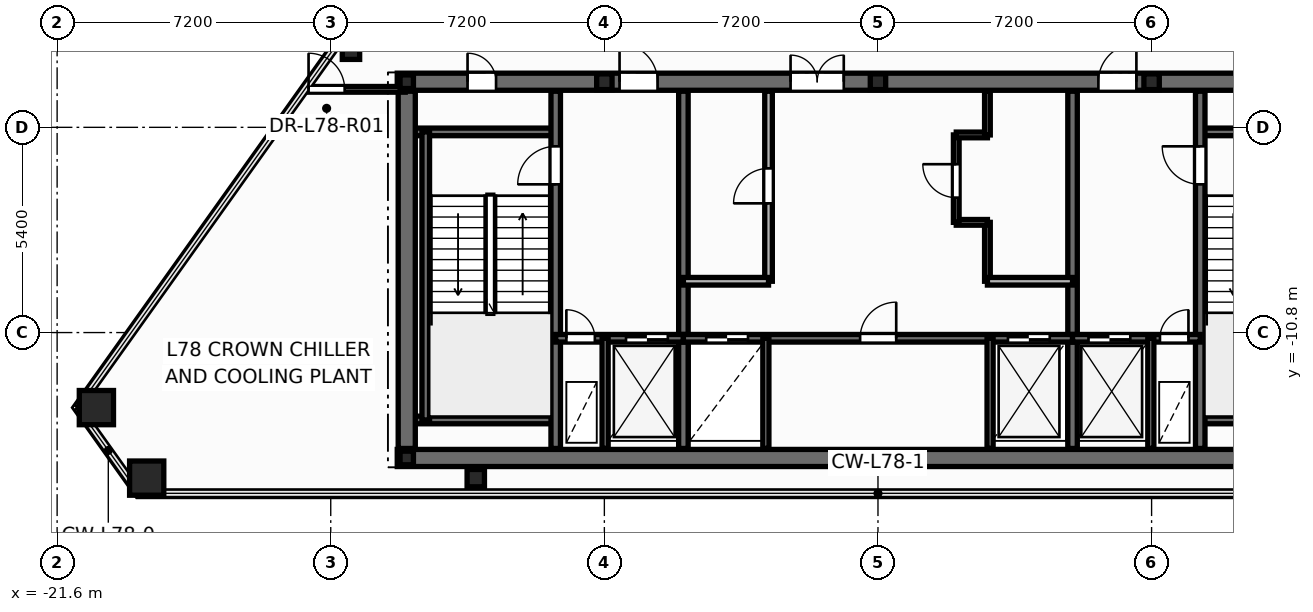
"""IFC4 building model, lengths in metres.
Left out: names, types, materials, properties, quantities, classifications, styles, units other than length and angle.
Written with IfcOpenShell. Run it as: python <this file> out.ifc"""

import sys

from ifc_helpers import new_model, si_unit, direction, frame, frame_2d, origin, origin_2d, place, context, subcontext, project, spatial, rectangle, hollow_rectangle, hollow_circle, i_section, extrude, element, fill, save


model = new_model("IFC4")
c1 = context("Model", 3, precision=1e-05, world=origin(), true_north=direction((0.0, 1.0)))
c2 = subcontext(c1, "Body", "Model", "MODEL_VIEW")
j1 = project(units=[si_unit("LENGTHUNIT", "METRE"), si_unit("PLANEANGLEUNIT", "RADIAN")], contexts=[c1])
p1 = place(None, origin())
s1 = spatial("IfcSite", under=j1, at=p1, CompositionType="ELEMENT")
p2 = place(p1, origin())
s2 = spatial("IfcBuilding", under=s1, at=p2, CompositionType="ELEMENT")
p3 = place(p2, frame((0.0, 0.0, 297.6)))
s3 = spatial("IfcBuildingStorey", under=s2, at=p3, CompositionType="ELEMENT", Elevation=297.6)
for number, where, z_axis, x_axis in (
    (1, (-20.567, -12.775, 0.0), (0.0, 0.0, 1.0), (1.0, 0.0, 0.0)),
    (2, (-19.243, -14.63, 0.0), (0.0, 0.0, 1.0), (1.0, 0.0, 0.0)),
):
    element("IfcColumn", number, at=place(p3, frame(where, z_axis=z_axis, x_axis=x_axis)), inside=s3, PredefinedType="COLUMN", context=c2, shape_type="SweptSolid", body=[
        extrude(hollow_rectangle(XDim=0.9, YDim=0.9, WallThickness=0.04, at=origin_2d()), origin(), (0.0, 0.0, 1.0), 4.2),
    ])
for number, where, z_axis, x_axis in (
    (3, (-10.583, -14.63, 0.0), (0.0, 0.0, 1.0), (1.0, 0.0, 0.0)),
    (4, (-13.868, -3.385, 0.0), (0.0, 0.0, 1.0), (1.0, 0.0, 0.0)),
):
    element("IfcColumn", number, at=place(p3, frame(where, z_axis=z_axis, x_axis=x_axis)), inside=s3, PredefinedType="COLUMN", context=c2, shape_type="SweptSolid", body=[
        extrude(hollow_circle(Radius=0.229, WallThickness=0.016, at=origin_2d()), origin(), (0.0, 0.0, 1.0), 4.2),
    ])
for number, where, z_axis, x_axis in (
    (5, (-12.4, -14.1, 0.0), (0.0, 0.0, 1.0), (1.0, 0.0, 0.0)),
    (6, (-12.4, -4.2, 0.0), (0.0, 0.0, 1.0), (1.0, 0.0, 0.0)),
):
    element("IfcColumn", number, at=place(p3, frame(where, z_axis=z_axis, x_axis=x_axis)), inside=s3, PredefinedType="COLUMN", context=c2, shape_type="SweptSolid", body=[
        extrude(i_section(OverallWidth=0.352, OverallDepth=0.359, WebThickness=0.018, FlangeThickness=0.026, at=origin_2d()), origin(), (0.0, 0.0, 1.0), 4.2),
    ])
for number, where, z_axis, x_axis in (
    (7, (-7.2, -4.2, 0.0), (0.0, 0.0, 1.0), (1.0, 0.0, 0.0)),
    (8, (0.0, -4.2, 0.0), (0.0, 0.0, 1.0), (1.0, 0.0, 0.0)),
    (9, (7.2, -4.2, 0.0), (0.0, 0.0, 1.0), (1.0, 0.0, 0.0)),
):
    element("IfcColumn", number, at=place(p3, frame(where, z_axis=z_axis, x_axis=x_axis)), inside=s3, PredefinedType="PILASTER", context=c2, shape_type="SweptSolid", body=[
        extrude(i_section(OverallWidth=0.405, OverallDepth=0.414, WebThickness=0.022, FlangeThickness=0.032, at=origin_2d()), origin(), (0.0, 0.0, 1.0), 4.2),
    ])
p4 = place(p3, frame((2.88, -9.45, 0.0), z_axis=(0.0, 0.0, 1.0), x_axis=(0.0, 1.0, 0.0)))
e10 = element("IfcWall", 10, at=p4, inside=s3, PredefinedType="PARTITIONING", context=c2, shape_type="SweptSolid", body=[
    extrude(rectangle(XDim=1.55, YDim=0.15, at=frame_2d((0.775, 0.0))), origin(), (0.0, 0.0, 1.0), 3.88),
])
p5 = place(p3, frame((2.06, -7.9, 0.0), z_axis=(0.0, 0.0, 1.0), x_axis=(1.0, 0.0, 0.0)))
e11 = element("IfcWall", 11, at=p5, inside=s3, PredefinedType="PARTITIONING", context=c2, shape_type="SweptSolid", body=[
    extrude(rectangle(XDim=0.82, YDim=0.15, at=frame_2d((0.41, 0.0))), origin(), (0.0, 0.0, 1.0), 3.88),
])
p6 = place(p3, frame((2.06, -7.9, 0.0), z_axis=(0.0, 0.0, 1.0), x_axis=(0.0, 1.0, 0.0)))
e12 = element("IfcWall", 12, at=p6, inside=s3, PredefinedType="PARTITIONING", context=c2, shape_type="SweptSolid", body=[
    extrude(rectangle(XDim=2.3, YDim=0.15, at=frame_2d((1.15, 0.0))), origin(), (0.0, 0.0, 1.0), 3.88),
])
p7 = place(p6, frame((0.65, 0.0, 0.0)))
e13 = element("IfcOpeningElement", 13, at=p7, cuts=e12, PredefinedType="OPENING", context=c2, shape_type="SweptSolid", body=[
    extrude(rectangle(XDim=0.886, YDim=2.104, at=frame_2d((0.44, 1.052))), frame((0.0, 0.085, 0.0), z_axis=(0.0, -1.0, 0.0), x_axis=(1.0, 0.0, 0.0)), (0.0, 0.0, 1.0), 0.17),
])
p8 = place(p3, frame((2.06, -5.6, 0.0), z_axis=(0.0, 0.0, 1.0), x_axis=(1.0, 0.0, 0.0)))
e14 = element("IfcWall", 14, at=p8, inside=s3, PredefinedType="PARTITIONING", context=c2, shape_type="SweptSolid", body=[
    extrude(rectangle(XDim=0.82, YDim=0.15, at=frame_2d((0.41, 0.0))), origin(), (0.0, 0.0, 1.0), 3.88),
])
p9 = place(p3, frame((2.88, -5.6, 0.0), z_axis=(0.0, 0.0, 1.0), x_axis=(0.0, 1.0, 0.0)))
e15 = element("IfcWall", 15, at=p9, inside=s3, PredefinedType="PARTITIONING", context=c2, shape_type="SweptSolid", body=[
    extrude(rectangle(XDim=1.15, YDim=0.15, at=frame_2d((0.575, 0.0))), origin(), (0.0, 0.0, 1.0), 3.88),
])
p10 = place(p3, frame((-12.65, -14.1, 0.0), z_axis=(0.0, 0.0, 1.0), x_axis=(1.0, 0.0, 0.0)))
e16 = element("IfcWall", 16, at=p10, inside=s3, PredefinedType="SHEAR", context=c2, shape_type="SweptSolid", body=[
    extrude(rectangle(XDim=25.3, YDim=0.45, at=frame_2d((12.65, 0.0))), origin(), (0.0, 0.0, 1.0), 4.2),
])
p11 = place(p3, frame((-12.65, -4.2, 0.0), z_axis=(0.0, 0.0, 1.0), x_axis=(1.0, 0.0, 0.0)))
e17 = element("IfcWall", 17, at=p11, inside=s3, PredefinedType="SHEAR", context=c2, shape_type="SweptSolid", body=[
    extrude(rectangle(XDim=25.3, YDim=0.45, at=frame_2d((12.65, 0.0))), origin(), (0.0, 0.0, 1.0), 4.2),
])
p12 = place(p11, frame((1.85, 0.0, 0.0)))
e18 = element("IfcOpeningElement", 18, at=p12, cuts=e17, PredefinedType="OPENING", context=c2, shape_type="SweptSolid", body=[
    extrude(rectangle(XDim=0.756, YDim=2.054, at=frame_2d((0.375, 1.027))), frame((0.0, 0.235, 0.0), z_axis=(0.0, -1.0, 0.0), x_axis=(1.0, 0.0, 0.0)), (0.0, 0.0, 1.0), 0.47),
])
p13 = place(p11, frame((22.65, 0.0, 0.0)))
e19 = element("IfcOpeningElement", 19, at=p13, cuts=e17, PredefinedType="OPENING", context=c2, shape_type="SweptSolid", body=[
    extrude(rectangle(XDim=0.756, YDim=2.054, at=frame_2d((0.375, 1.027))), frame((0.0, 0.235, 0.0), z_axis=(0.0, -1.0, 0.0), x_axis=(1.0, 0.0, 0.0)), (0.0, 0.0, 1.0), 0.47),
])
p14 = place(p11, frame((5.85, 0.0, 0.0)))
e20 = element("IfcOpeningElement", 20, at=p14, cuts=e17, PredefinedType="OPENING", context=c2, shape_type="SweptSolid", body=[
    extrude(rectangle(XDim=1.006, YDim=2.104, at=frame_2d((0.5, 1.052))), frame((0.0, 0.235, 0.0), z_axis=(0.0, -1.0, 0.0), x_axis=(1.0, 0.0, 0.0)), (0.0, 0.0, 1.0), 0.47),
])
p15 = place(p11, frame((10.35, 0.0, 0.0)))
e21 = element("IfcOpeningElement", 21, at=p15, cuts=e17, PredefinedType="OPENING", context=c2, shape_type="SweptSolid", body=[
    extrude(rectangle(XDim=1.406, YDim=2.154, at=frame_2d((0.7, 1.077))), frame((0.0, 0.235, 0.0), z_axis=(0.0, -1.0, 0.0), x_axis=(1.0, 0.0, 0.0)), (0.0, 0.0, 1.0), 0.47),
])
p16 = place(p11, frame((18.45, 0.0, 0.0)))
e22 = element("IfcOpeningElement", 22, at=p16, cuts=e17, PredefinedType="OPENING", context=c2, shape_type="SweptSolid", body=[
    extrude(rectangle(XDim=1.006, YDim=2.104, at=frame_2d((0.5, 1.052))), frame((0.0, 0.235, 0.0), z_axis=(0.0, -1.0, 0.0), x_axis=(1.0, 0.0, 0.0)), (0.0, 0.0, 1.0), 0.47),
])
for number, where, z_axis, x_axis in (
    (23, (-12.35, -5.52, 0.0), (0.0, 0.0, 1.0), (1.0, 0.0, 0.0)),
    (24, (-12.35, -13.1, 0.0), (0.0, 0.0, 1.0), (1.0, 0.0, 0.0)),
):
    element("IfcWall", number, at=place(p3, frame(where, z_axis=z_axis, x_axis=x_axis)), inside=s3, PredefinedType="SOLIDWALL", context=c2, shape_type="SweptSolid", body=[
        extrude(rectangle(XDim=3.87, YDim=0.2, at=frame_2d((1.935, 0.0))), origin(), (0.0, 0.0, 1.0), 4.2),
    ])
p17 = place(p3, frame((-11.9, -13.1, 0.0), z_axis=(0.0, 0.0, 1.0), x_axis=(0.0, 1.0, 0.0)))
e25 = element("IfcWall", 25, at=p17, inside=s3, PredefinedType="SOLIDWALL", context=c2, shape_type="SweptSolid", body=[
    extrude(rectangle(XDim=7.58, YDim=0.2, at=frame_2d((3.79, 0.0))), origin(), (0.0, 0.0, 1.0), 4.2),
])
for number, where, z_axis, x_axis in (
    (26, (8.48, -5.52, 0.0), (0.0, 0.0, 1.0), (1.0, 0.0, 0.0)),
    (27, (8.48, -13.1, 0.0), (0.0, 0.0, 1.0), (1.0, 0.0, 0.0)),
):
    element("IfcWall", number, at=place(p3, frame(where, z_axis=z_axis, x_axis=x_axis)), inside=s3, PredefinedType="SOLIDWALL", context=c2, shape_type="SweptSolid", body=[
        extrude(rectangle(XDim=3.87, YDim=0.2, at=frame_2d((1.935, 0.0))), origin(), (0.0, 0.0, 1.0), 4.2),
    ])
p18 = place(p3, frame((-8.48, -13.85, 0.0), z_axis=(0.0, 0.0, 1.0), x_axis=(0.0, 1.0, 0.0)))
e28 = element("IfcWall", 28, at=p18, inside=s3, PredefinedType="SHEAR", context=c2, shape_type="SweptSolid", body=[
    extrude(rectangle(XDim=9.4, YDim=0.25, at=frame_2d((4.7, 0.0))), origin(), (0.0, 0.0, 1.0), 4.2),
])
p19 = place(p18, frame((6.95, 0.0, 0.0)))
e29 = element("IfcOpeningElement", 29, at=p19, cuts=e28, PredefinedType="OPENING", context=c2, shape_type="SweptSolid", body=[
    extrude(rectangle(XDim=1.006, YDim=2.104, at=frame_2d((0.5, 1.052))), frame((0.0, 0.135, 0.0), z_axis=(0.0, -1.0, 0.0), x_axis=(1.0, 0.0, 0.0)), (0.0, 0.0, 1.0), 0.27),
])
p20 = place(p3, frame((8.48, -13.85, 0.0), z_axis=(0.0, 0.0, 1.0), x_axis=(0.0, 1.0, 0.0)))
e30 = element("IfcWall", 30, at=p20, inside=s3, PredefinedType="SHEAR", context=c2, shape_type="SweptSolid", body=[
    extrude(rectangle(XDim=9.4, YDim=0.25, at=frame_2d((4.7, 0.0))), origin(), (0.0, 0.0, 1.0), 4.2),
])
p21 = place(p20, frame((6.95, 0.0, 0.0)))
e31 = element("IfcOpeningElement", 31, at=p21, cuts=e30, PredefinedType="OPENING", context=c2, shape_type="SweptSolid", body=[
    extrude(rectangle(XDim=1.006, YDim=2.104, at=frame_2d((0.5, 1.052))), frame((0.0, 0.135, 0.0), z_axis=(0.0, -1.0, 0.0), x_axis=(1.0, 0.0, 0.0)), (0.0, 0.0, 1.0), 0.27),
])
for number, where, z_axis, x_axis in (
    (32, (-5.12, -13.85, 0.0), (0.0, 0.0, 1.0), (0.0, 1.0, 0.0)),
    (33, (5.12, -13.85, 0.0), (0.0, 0.0, 1.0), (0.0, 1.0, 0.0)),
):
    element("IfcWall", number, at=place(p3, frame(where, z_axis=z_axis, x_axis=x_axis)), inside=s3, PredefinedType="SHEAR", context=c2, shape_type="SweptSolid", body=[
        extrude(rectangle(XDim=9.4, YDim=0.25, at=frame_2d((4.7, 0.0))), origin(), (0.0, 0.0, 1.0), 4.2),
    ])
p22 = place(p3, frame((-8.48, -10.95, 0.0), z_axis=(0.0, 0.0, 1.0), x_axis=(1.0, 0.0, 0.0)))
e34 = element("IfcWall", 34, at=p22, inside=s3, PredefinedType="SOLIDWALL", context=c2, shape_type="SweptSolid", body=[
    extrude(rectangle(XDim=3.36, YDim=0.2, at=frame_2d((1.68, 0.0))), origin(), (0.0, 0.0, 1.0), 4.2),
])
p23 = place(p22, frame((0.28, 0.0, 0.0)))
e35 = element("IfcOpeningElement", 35, at=p23, cuts=e34, PredefinedType="OPENING", context=c2, shape_type="SweptSolid", body=[
    extrude(rectangle(XDim=0.756, YDim=2.054, at=frame_2d((0.375, 1.027))), frame((0.0, 0.11, 0.0), z_axis=(0.0, -1.0, 0.0), x_axis=(1.0, 0.0, 0.0)), (0.0, 0.0, 1.0), 0.22),
])
p24 = place(p22, frame((1.85, 0.0, 0.0)))
e36 = element("IfcOpeningElement", 36, at=p24, cuts=e34, PredefinedType="OPENING", context=c2, shape_type="SweptSolid", body=[
    extrude(rectangle(XDim=1.106, YDim=2.104, at=frame_2d((0.55, 1.052))), frame((0.0, 0.11, 0.0), z_axis=(0.0, -1.0, 0.0), x_axis=(1.0, 0.0, 0.0)), (0.0, 0.0, 1.0), 0.22),
])
p25 = place(p3, frame((-5.12, -10.95, 0.0), z_axis=(0.0, 0.0, 1.0), x_axis=(1.0, 0.0, 0.0)))
e37 = element("IfcWall", 37, at=p25, inside=s3, PredefinedType="SOLIDWALL", context=c2, shape_type="SweptSolid", body=[
    extrude(rectangle(XDim=10.24, YDim=0.2, at=frame_2d((5.12, 0.0))), origin(), (0.0, 0.0, 1.0), 4.2),
])
p26 = place(p25, frame((0.6, 0.0, 0.0)))
e38 = element("IfcOpeningElement", 38, at=p26, cuts=e37, PredefinedType="OPENING", context=c2, shape_type="SweptSolid", body=[
    extrude(rectangle(XDim=1.106, YDim=2.104, at=frame_2d((0.55, 1.052))), frame((0.0, 0.11, 0.0), z_axis=(0.0, -1.0, 0.0), x_axis=(1.0, 0.0, 0.0)), (0.0, 0.0, 1.0), 0.22),
])
p27 = place(p25, frame((4.65, 0.0, 0.0)))
e39 = element("IfcOpeningElement", 39, at=p27, cuts=e37, PredefinedType="OPENING", context=c2, shape_type="SweptSolid", body=[
    extrude(rectangle(XDim=0.956, YDim=2.104, at=frame_2d((0.475, 1.052))), frame((0.0, 0.11, 0.0), z_axis=(0.0, -1.0, 0.0), x_axis=(1.0, 0.0, 0.0)), (0.0, 0.0, 1.0), 0.22),
])
p28 = place(p25, frame((8.54, 0.0, 0.0)))
e40 = element("IfcOpeningElement", 40, at=p28, cuts=e37, PredefinedType="OPENING", context=c2, shape_type="SweptSolid", body=[
    extrude(rectangle(XDim=1.106, YDim=2.104, at=frame_2d((0.55, 1.052))), frame((0.0, 0.11, 0.0), z_axis=(0.0, -1.0, 0.0), x_axis=(1.0, 0.0, 0.0)), (0.0, 0.0, 1.0), 0.22),
])
p29 = place(p3, frame((5.12, -10.95, 0.0), z_axis=(0.0, 0.0, 1.0), x_axis=(1.0, 0.0, 0.0)))
e41 = element("IfcWall", 41, at=p29, inside=s3, PredefinedType="SOLIDWALL", context=c2, shape_type="SweptSolid", body=[
    extrude(rectangle(XDim=3.36, YDim=0.2, at=frame_2d((1.68, 0.0))), origin(), (0.0, 0.0, 1.0), 4.2),
])
p30 = place(p29, frame((0.42, 0.0, 0.0)))
e42 = element("IfcOpeningElement", 42, at=p30, cuts=e41, PredefinedType="OPENING", context=c2, shape_type="SweptSolid", body=[
    extrude(rectangle(XDim=1.106, YDim=2.104, at=frame_2d((0.55, 1.052))), frame((0.0, 0.11, 0.0), z_axis=(0.0, -1.0, 0.0), x_axis=(1.0, 0.0, 0.0)), (0.0, 0.0, 1.0), 0.22),
])
p31 = place(p29, frame((2.3, 0.0, 0.0)))
e43 = element("IfcOpeningElement", 43, at=p31, cuts=e41, PredefinedType="OPENING", context=c2, shape_type="SweptSolid", body=[
    extrude(rectangle(XDim=0.756, YDim=2.054, at=frame_2d((0.375, 1.027))), frame((0.0, 0.11, 0.0), z_axis=(0.0, -1.0, 0.0), x_axis=(1.0, 0.0, 0.0)), (0.0, 0.0, 1.0), 0.22),
])
for number, where, z_axis, x_axis in (
    (44, (-7.18, -13.85, 0.0), (0.0, 0.0, 1.0), (0.0, 1.0, 0.0)),
    (45, (7.18, -13.85, 0.0), (0.0, 0.0, 1.0), (0.0, 1.0, 0.0)),
    (46, (-2.95, -13.85, 0.0), (0.0, 0.0, 1.0), (0.0, 1.0, 0.0)),
    (47, (2.95, -13.85, 0.0), (0.0, 0.0, 1.0), (0.0, 1.0, 0.0)),
):
    element("IfcWall", number, at=place(p3, frame(where, z_axis=z_axis, x_axis=x_axis)), inside=s3, PredefinedType="PARTITIONING", context=c2, shape_type="SweptSolid", body=[
        extrude(rectangle(XDim=2.9, YDim=0.16, at=frame_2d((1.45, 0.0))), origin(), (0.0, 0.0, 1.0), 3.105),
    ])
p32 = place(p3, frame((-12.4, -13.85, 0.0), z_axis=(0.0, 0.0, 1.0), x_axis=(0.0, 1.0, 0.0)))
e48 = element("IfcWall", 48, at=p32, inside=s3, PredefinedType="SHEAR", context=c2, shape_type="SweptSolid", body=[
    extrude(rectangle(XDim=9.4, YDim=0.45, at=frame_2d((4.7, 0.0))), origin(), (0.0, 0.0, 1.0), 4.2),
])
p33 = place(p3, frame((-2.88, -9.45, 0.0), z_axis=(0.0, 0.0, 1.0), x_axis=(0.0, 1.0, 0.0)))
e49 = element("IfcWall", 49, at=p33, inside=s3, PredefinedType="SOLIDWALL", context=c2, shape_type="SweptSolid", body=[
    extrude(rectangle(XDim=5.0, YDim=0.2, at=frame_2d((2.5, 0.0))), origin(), (0.0, 0.0, 1.0), 3.88),
])
p34 = place(p33, frame((2.05, 0.0, 0.0)))
e50 = element("IfcOpeningElement", 50, at=p34, cuts=e49, PredefinedType="OPENING", context=c2, shape_type="SweptSolid", body=[
    extrude(rectangle(XDim=0.926, YDim=2.104, at=frame_2d((0.46, 1.052))), frame((0.0, 0.11, 0.0), z_axis=(0.0, -1.0, 0.0), x_axis=(1.0, 0.0, 0.0)), (0.0, 0.0, 1.0), 0.22),
])
for number, where, z_axis, x_axis in (
    (51, (-5.12, -9.45, 0.0), (0.0, 0.0, 1.0), (1.0, 0.0, 0.0)),
    (52, (2.88, -9.45, 0.0), (0.0, 0.0, 1.0), (1.0, 0.0, 0.0)),
):
    element("IfcWall", number, at=place(p3, frame(where, z_axis=z_axis, x_axis=x_axis)), inside=s3, PredefinedType="SOLIDWALL", context=c2, shape_type="SweptSolid", body=[
        extrude(rectangle(XDim=2.24, YDim=0.2, at=frame_2d((1.12, 0.0))), origin(), (0.0, 0.0, 1.0), 3.88),
    ])
p35 = place(p3, frame((-15.083, -4.4, 0.0), z_axis=(0.0, 0.0, 1.0), x_axis=(1.0, 0.0, 0.0)))
e53 = element("IfcWall", 53, at=p35, inside=s3, PredefinedType="PARTITIONING", context=c2, shape_type="SweptSolid", body=[
    extrude(rectangle(XDim=2.644, YDim=0.15, at=frame_2d((1.322, 0.0))), origin(), (0.0, 0.0, 1.0), 2.855),
])
p36 = place(p35, frame((0.1, 0.0, 0.0)))
e54 = element("IfcOpeningElement", 54, at=p36, cuts=e53, PredefinedType="OPENING", context=c2, shape_type="SweptSolid", body=[
    extrude(rectangle(XDim=0.956, YDim=2.104, at=frame_2d((0.475, 1.052))), frame((0.0, 0.085, 0.0), z_axis=(0.0, -1.0, 0.0), x_axis=(1.0, 0.0, 0.0)), (0.0, 0.0, 1.0), 0.17),
])
p37 = place(p34, origin())
e55 = element("IfcDoor", 55, at=p37, inside=s3, OperationType="SINGLE_SWING_LEFT", PredefinedType="DOOR", context=c2, shape_type="SweptSolid", body=[
    extrude(rectangle(XDim=0.92, YDim=2.1, at=frame_2d((0.46, 1.05))), frame((0.0, 0.025, 0.0), z_axis=(0.0, -1.0, 0.0), x_axis=(1.0, 0.0, 0.0)), (0.0, 0.0, 1.0), 0.05),
])
fill(e50, e55)
p38 = place(p7, origin())
e56 = element("IfcDoor", 56, at=p38, inside=s3, OperationType="SINGLE_SWING_RIGHT", PredefinedType="DOOR", context=c2, shape_type="SweptSolid", body=[
    extrude(rectangle(XDim=0.88, YDim=2.1, at=frame_2d((0.44, 1.05))), frame((0.0, 0.025, 0.0), z_axis=(0.0, -1.0, 0.0), x_axis=(1.0, 0.0, 0.0)), (0.0, 0.0, 1.0), 0.05),
])
fill(e13, e56)
p39 = place(p19, origin())
e57 = element("IfcDoor", 57, at=p39, inside=s3, OperationType="SINGLE_SWING_LEFT", PredefinedType="DOOR", context=c2, shape_type="SweptSolid", body=[
    extrude(rectangle(XDim=1.0, YDim=2.1, at=frame_2d((0.5, 1.05))), frame((0.0, 0.025, 0.0), z_axis=(0.0, -1.0, 0.0), x_axis=(1.0, 0.0, 0.0)), (0.0, 0.0, 1.0), 0.05),
])
fill(e29, e57)
p40 = place(p21, origin())
e58 = element("IfcDoor", 58, at=p40, inside=s3, OperationType="SINGLE_SWING_RIGHT", PredefinedType="DOOR", context=c2, shape_type="SweptSolid", body=[
    extrude(rectangle(XDim=1.0, YDim=2.1, at=frame_2d((0.5, 1.05))), frame((0.0, 0.025, 0.0), z_axis=(0.0, -1.0, 0.0), x_axis=(1.0, 0.0, 0.0)), (0.0, 0.0, 1.0), 0.05),
])
fill(e31, e58)
p41 = place(p23, origin())
e59 = element("IfcDoor", 59, at=p41, inside=s3, OperationType="SINGLE_SWING_LEFT", PredefinedType="DOOR", context=c2, shape_type="SweptSolid", body=[
    extrude(rectangle(XDim=0.75, YDim=2.05, at=frame_2d((0.375, 1.025))), frame((0.0, 0.025, 0.0), z_axis=(0.0, -1.0, 0.0), x_axis=(1.0, 0.0, 0.0)), (0.0, 0.0, 1.0), 0.05),
])
fill(e35, e59)
p42 = place(p24, origin())
e60 = element("IfcDoor", 60, at=p42, inside=s3, OperationType="DOUBLE_DOOR_SLIDING", PredefinedType="DOOR", context=c2, shape_type="SweptSolid", body=[
    extrude(rectangle(XDim=1.1, YDim=2.1, at=frame_2d((0.55, 1.05))), frame((0.0, 0.025, 0.0), z_axis=(0.0, -1.0, 0.0), x_axis=(1.0, 0.0, 0.0)), (0.0, 0.0, 1.0), 0.05),
])
fill(e36, e60)
p43 = place(p30, origin())
e61 = element("IfcDoor", 61, at=p43, inside=s3, OperationType="DOUBLE_DOOR_SLIDING", PredefinedType="DOOR", context=c2, shape_type="SweptSolid", body=[
    extrude(rectangle(XDim=1.1, YDim=2.1, at=frame_2d((0.55, 1.05))), frame((0.0, 0.025, 0.0), z_axis=(0.0, -1.0, 0.0), x_axis=(1.0, 0.0, 0.0)), (0.0, 0.0, 1.0), 0.05),
])
fill(e42, e61)
p44 = place(p31, origin())
e62 = element("IfcDoor", 62, at=p44, inside=s3, OperationType="SINGLE_SWING_RIGHT", PredefinedType="DOOR", context=c2, shape_type="SweptSolid", body=[
    extrude(rectangle(XDim=0.75, YDim=2.05, at=frame_2d((0.375, 1.025))), frame((0.0, 0.025, 0.0), z_axis=(0.0, -1.0, 0.0), x_axis=(1.0, 0.0, 0.0)), (0.0, 0.0, 1.0), 0.05),
])
fill(e43, e62)
p45 = place(p26, origin())
e63 = element("IfcDoor", 63, at=p45, inside=s3, OperationType="DOUBLE_DOOR_SLIDING", PredefinedType="DOOR", context=c2, shape_type="SweptSolid", body=[
    extrude(rectangle(XDim=1.1, YDim=2.1, at=frame_2d((0.55, 1.05))), frame((0.0, 0.025, 0.0), z_axis=(0.0, -1.0, 0.0), x_axis=(1.0, 0.0, 0.0)), (0.0, 0.0, 1.0), 0.05),
])
fill(e38, e63)
p46 = place(p27, origin())
e64 = element("IfcDoor", 64, at=p46, inside=s3, OperationType="SINGLE_SWING_RIGHT", PredefinedType="DOOR", context=c2, shape_type="SweptSolid", body=[
    extrude(rectangle(XDim=0.95, YDim=2.1, at=frame_2d((0.475, 1.05))), frame((0.0, 0.025, 0.0), z_axis=(0.0, -1.0, 0.0), x_axis=(1.0, 0.0, 0.0)), (0.0, 0.0, 1.0), 0.05),
])
fill(e39, e64)
p47 = place(p28, origin())
e65 = element("IfcDoor", 65, at=p47, inside=s3, OperationType="DOUBLE_DOOR_SLIDING", PredefinedType="DOOR", context=c2, shape_type="SweptSolid", body=[
    extrude(rectangle(XDim=1.1, YDim=2.1, at=frame_2d((0.55, 1.05))), frame((0.0, 0.025, 0.0), z_axis=(0.0, -1.0, 0.0), x_axis=(1.0, 0.0, 0.0)), (0.0, 0.0, 1.0), 0.05),
])
fill(e40, e65)
p48 = place(p12, origin())
e66 = element("IfcDoor", 66, at=p48, inside=s3, OperationType="SINGLE_SWING_LEFT", PredefinedType="DOOR", context=c2, shape_type="SweptSolid", body=[
    extrude(rectangle(XDim=0.75, YDim=2.05, at=frame_2d((0.375, 1.025))), frame((0.0, 0.025, 0.0), z_axis=(0.0, -1.0, 0.0), x_axis=(1.0, 0.0, 0.0)), (0.0, 0.0, 1.0), 0.05),
])
fill(e18, e66)
p49 = place(p14, origin())
e67 = element("IfcDoor", 67, at=p49, inside=s3, OperationType="SINGLE_SWING_LEFT", PredefinedType="DOOR", context=c2, shape_type="SweptSolid", body=[
    extrude(rectangle(XDim=1.0, YDim=2.1, at=frame_2d((0.5, 1.05))), frame((0.0, 0.025, 0.0), z_axis=(0.0, -1.0, 0.0), x_axis=(1.0, 0.0, 0.0)), (0.0, 0.0, 1.0), 0.05),
])
fill(e20, e67)
p50 = place(p15, origin())
e68 = element("IfcDoor", 68, at=p50, inside=s3, OperationType="DOUBLE_DOOR_SINGLE_SWING", PredefinedType="DOOR", context=c2, shape_type="SweptSolid", body=[
    extrude(rectangle(XDim=1.4, YDim=2.15, at=frame_2d((0.7, 1.075))), frame((0.0, 0.025, 0.0), z_axis=(0.0, -1.0, 0.0), x_axis=(1.0, 0.0, 0.0)), (0.0, 0.0, 1.0), 0.05),
])
fill(e21, e68)
p51 = place(p16, origin())
e69 = element("IfcDoor", 69, at=p51, inside=s3, OperationType="SINGLE_SWING_RIGHT", PredefinedType="DOOR", context=c2, shape_type="SweptSolid", body=[
    extrude(rectangle(XDim=1.0, YDim=2.1, at=frame_2d((0.5, 1.05))), frame((0.0, 0.025, 0.0), z_axis=(0.0, -1.0, 0.0), x_axis=(1.0, 0.0, 0.0)), (0.0, 0.0, 1.0), 0.05),
])
fill(e22, e69)
p52 = place(p36, origin())
e70 = element("IfcDoor", 70, at=p52, inside=s3, OperationType="SINGLE_SWING_LEFT", PredefinedType="DOOR", context=c2, shape_type="SweptSolid", body=[
    extrude(rectangle(XDim=0.95, YDim=2.1, at=frame_2d((0.475, 1.05))), frame((0.0, 0.025, 0.0), z_axis=(0.0, -1.0, 0.0), x_axis=(1.0, 0.0, 0.0)), (0.0, 0.0, 1.0), 0.05),
])
fill(e54, e70)
save(model, sys.argv[1])
